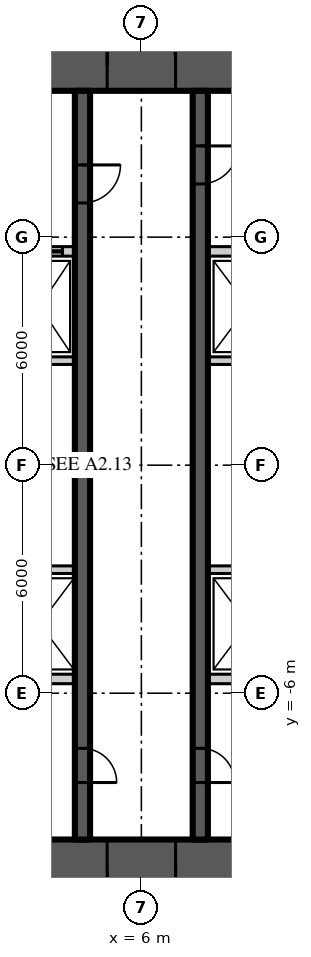
"""IFC4 building model, lengths in metres.
Left out: names, types, materials, properties, quantities, classifications, styles, units other than length and angle.
Written with IfcOpenShell. Run it as: python <this file> out.ifc"""

import sys

from ifc_helpers import new_model, si_unit, direction, frame, frame_2d, origin, place, context, subcontext, project, spatial, rectangle, extrude, element, fill, save


model = new_model("IFC4")
c1 = context("Model", 3, precision=1e-05, world=origin(), true_north=direction((0.0, 1.0)))
c2 = subcontext(c1, "Body", "Model", "MODEL_VIEW")
j1 = project(units=[si_unit("LENGTHUNIT", "METRE"), si_unit("PLANEANGLEUNIT", "RADIAN")], contexts=[c1])
p1 = place(None, origin())
s1 = spatial("IfcSite", under=j1, at=p1, CompositionType="ELEMENT")
p2 = place(p1, origin())
s2 = spatial("IfcBuilding", under=s1, at=p2, CompositionType="ELEMENT")
p3 = place(p2, frame((0.0, 0.0, 82.5)))
s3 = spatial("IfcBuildingStorey", under=s2, at=p3, CompositionType="ELEMENT", Elevation=82.5)
p4 = place(p3, frame((-11.15, 10.5, 0.0), z_axis=(0.0, 0.0, 1.0), x_axis=(1.0, 0.0, 0.0)))
e1 = element("IfcWall", 1, at=p4, inside=s3, PredefinedType="SHEAR", context=c2, shape_type="SweptSolid", body=[
    extrude(rectangle(XDim=22.3, YDim=1.3, at=frame_2d((11.15, 0.0))), origin(), (0.0, 0.0, 1.0), 3.9),
])
p5 = place(p4, frame((4.25, 0.0, 0.0)))
e2 = element("IfcOpeningElement", 2, at=p5, cuts=e1, PredefinedType="OPENING", context=c2, shape_type="SweptSolid", body=[
    extrude(rectangle(XDim=1.8, YDim=2.2, at=frame_2d((0.9, 1.1))), frame((0.0, 0.66, 0.0), z_axis=(0.0, -1.0, 0.0), x_axis=(1.0, 0.0, 0.0)), (0.0, 0.0, 1.0), 1.32),
])
p6 = place(p4, frame((16.25, 0.0, 0.0)))
e3 = element("IfcOpeningElement", 3, at=p6, cuts=e1, PredefinedType="OPENING", context=c2, shape_type="SweptSolid", body=[
    extrude(rectangle(XDim=1.8, YDim=2.2, at=frame_2d((0.9, 1.1))), frame((0.0, 0.66, 0.0), z_axis=(0.0, -1.0, 0.0), x_axis=(1.0, 0.0, 0.0)), (0.0, 0.0, 1.0), 1.32),
])
p7 = place(p3, frame((11.15, -10.5, 0.0), z_axis=(0.0, 0.0, 1.0), x_axis=(-1.0, 0.0, 0.0)))
e4 = element("IfcWall", 4, at=p7, inside=s3, PredefinedType="SHEAR", context=c2, shape_type="SweptSolid", body=[
    extrude(rectangle(XDim=22.3, YDim=1.3, at=frame_2d((11.15, 0.0))), origin(), (0.0, 0.0, 1.0), 3.9),
])
p8 = place(p7, frame((16.25, 0.0, 0.0)))
e5 = element("IfcOpeningElement", 5, at=p8, cuts=e4, PredefinedType="OPENING", context=c2, shape_type="SweptSolid", body=[
    extrude(rectangle(XDim=1.8, YDim=2.2, at=frame_2d((0.9, 1.1))), frame((0.0, 0.66, 0.0), z_axis=(0.0, -1.0, 0.0), x_axis=(1.0, 0.0, 0.0)), (0.0, 0.0, 1.0), 1.32),
])
p9 = place(p7, frame((4.25, 0.0, 0.0)))
e6 = element("IfcOpeningElement", 6, at=p9, cuts=e4, PredefinedType="OPENING", context=c2, shape_type="SweptSolid", body=[
    extrude(rectangle(XDim=1.8, YDim=2.2, at=frame_2d((0.9, 1.1))), frame((0.0, 0.66, 0.0), z_axis=(0.0, -1.0, 0.0), x_axis=(1.0, 0.0, 0.0)), (0.0, 0.0, 1.0), 1.32),
])
p10 = place(p3, frame((7.55, 9.85, 0.0), z_axis=(0.0, 0.0, 1.0), x_axis=(0.0, -1.0, 0.0)))
e7 = element("IfcWall", 7, at=p10, inside=s3, PredefinedType="SHEAR", context=c2, shape_type="SweptSolid", body=[
    extrude(rectangle(XDim=19.7, YDim=0.4, at=frame_2d((9.85, 0.0))), origin(), (0.0, 0.0, 1.0), 3.9),
])
p11 = place(p10, frame((1.45, 0.0, 0.0)))
e8 = element("IfcOpeningElement", 8, at=p11, cuts=e7, PredefinedType="OPENING", context=c2, shape_type="SweptSolid", body=[
    extrude(rectangle(XDim=1.0, YDim=2.2, at=frame_2d((0.5, 1.1))), frame((0.0, 0.21, 0.0), z_axis=(0.0, -1.0, 0.0), x_axis=(1.0, 0.0, 0.0)), (0.0, 0.0, 1.0), 0.42),
])
p12 = place(p10, frame((17.3, 0.0, 0.0)))
e9 = element("IfcOpeningElement", 9, at=p12, cuts=e7, PredefinedType="OPENING", context=c2, shape_type="SweptSolid", body=[
    extrude(rectangle(XDim=0.9, YDim=2.1, at=frame_2d((0.45, 1.05))), frame((0.0, 0.21, 0.0), z_axis=(0.0, -1.0, 0.0), x_axis=(1.0, 0.0, 0.0)), (0.0, 0.0, 1.0), 0.42),
])
p13 = place(p3, frame((4.45, 9.85, 0.0), z_axis=(0.0, 0.0, 1.0), x_axis=(0.0, -1.0, 0.0)))
e10 = element("IfcWall", 10, at=p13, inside=s3, PredefinedType="SHEAR", context=c2, shape_type="SweptSolid", body=[
    extrude(rectangle(XDim=19.7, YDim=0.4, at=frame_2d((9.85, 0.0))), origin(), (0.0, 0.0, 1.0), 3.9),
])
p14 = place(p13, frame((1.95, 0.0, 0.0)))
e11 = element("IfcOpeningElement", 11, at=p14, cuts=e10, PredefinedType="OPENING", context=c2, shape_type="SweptSolid", body=[
    extrude(rectangle(XDim=1.0, YDim=2.2, at=frame_2d((0.5, 1.1))), frame((0.0, 0.21, 0.0), z_axis=(0.0, -1.0, 0.0), x_axis=(1.0, 0.0, 0.0)), (0.0, 0.0, 1.0), 0.42),
])
p15 = place(p13, frame((17.3, 0.0, 0.0)))
e12 = element("IfcOpeningElement", 12, at=p15, cuts=e10, PredefinedType="OPENING", context=c2, shape_type="SweptSolid", body=[
    extrude(rectangle(XDim=0.9, YDim=2.1, at=frame_2d((0.45, 1.05))), frame((0.0, 0.21, 0.0), z_axis=(0.0, -1.0, 0.0), x_axis=(1.0, 0.0, 0.0)), (0.0, 0.0, 1.0), 0.42),
])
p16 = place(p3, frame((2.4, 5.625, 0.0), z_axis=(0.0, 0.0, 1.0), x_axis=(1.0, 0.0, 0.0)))
e13 = element("IfcWall", 13, at=p16, inside=s3, PredefinedType="SOLIDWALL", context=c2, shape_type="SweptSolid", body=[
    extrude(rectangle(XDim=1.85, YDim=0.25, at=frame_2d((0.925, 0.0))), origin(), (0.0, 0.0, 1.0), 3.7),
])
p17 = place(p16, frame((0.325, 0.0, 0.0)))
e14 = element("IfcOpeningElement", 14, at=p17, cuts=e13, PredefinedType="OPENING", context=c2, shape_type="SweptSolid", body=[
    extrude(rectangle(XDim=1.2, YDim=2.2, at=frame_2d((0.6, 1.1))), frame((0.0, 0.135, 0.0), z_axis=(0.0, -1.0, 0.0), x_axis=(1.0, 0.0, 0.0)), (0.0, 0.0, 1.0), 0.27),
])
p18 = place(p3, frame((7.75, 5.625, 0.0), z_axis=(0.0, 0.0, 1.0), x_axis=(1.0, 0.0, 0.0)))
e15 = element("IfcWall", 15, at=p18, inside=s3, PredefinedType="SOLIDWALL", context=c2, shape_type="SweptSolid", body=[
    extrude(rectangle(XDim=2.1, YDim=0.25, at=frame_2d((1.05, 0.0))), origin(), (0.0, 0.0, 1.0), 3.7),
])
p19 = place(p3, frame((2.4, -5.625, 0.0), z_axis=(0.0, 0.0, 1.0), x_axis=(1.0, 0.0, 0.0)))
e16 = element("IfcWall", 16, at=p19, inside=s3, PredefinedType="SOLIDWALL", context=c2, shape_type="SweptSolid", body=[
    extrude(rectangle(XDim=1.85, YDim=0.25, at=frame_2d((0.925, 0.0))), origin(), (0.0, 0.0, 1.0), 3.7),
])
p20 = place(p3, frame((7.75, -5.625, 0.0), z_axis=(0.0, 0.0, 1.0), x_axis=(1.0, 0.0, 0.0)))
e17 = element("IfcWall", 17, at=p20, inside=s3, PredefinedType="SOLIDWALL", context=c2, shape_type="SweptSolid", body=[
    extrude(rectangle(XDim=2.1, YDim=0.25, at=frame_2d((1.05, 0.0))), origin(), (0.0, 0.0, 1.0), 3.7),
])
p21 = place(p3, frame((2.4, -2.75, 0.0), z_axis=(0.0, 0.0, 1.0), x_axis=(1.0, 0.0, 0.0)))
e18 = element("IfcWall", 18, at=p21, inside=s3, PredefinedType="SOLIDWALL", context=c2, shape_type="SweptSolid", body=[
    extrude(rectangle(XDim=1.85, YDim=0.2, at=frame_2d((0.925, 0.0))), origin(), (0.0, 0.0, 1.0), 3.7),
])
p22 = place(p3, frame((7.75, -2.75, 0.0), z_axis=(0.0, 0.0, 1.0), x_axis=(1.0, 0.0, 0.0)))
e19 = element("IfcWall", 19, at=p22, inside=s3, PredefinedType="SOLIDWALL", context=c2, shape_type="SweptSolid", body=[
    extrude(rectangle(XDim=2.1, YDim=0.2, at=frame_2d((1.05, 0.0))), origin(), (0.0, 0.0, 1.0), 3.7),
])
p23 = place(p3, frame((2.4, 2.75, 0.0), z_axis=(0.0, 0.0, 1.0), x_axis=(1.0, 0.0, 0.0)))
e20 = element("IfcWall", 20, at=p23, inside=s3, PredefinedType="SOLIDWALL", context=c2, shape_type="SweptSolid", body=[
    extrude(rectangle(XDim=1.85, YDim=0.2, at=frame_2d((0.925, 0.0))), origin(), (0.0, 0.0, 1.0), 3.7),
])
p24 = place(p3, frame((7.75, 2.75, 0.0), z_axis=(0.0, 0.0, 1.0), x_axis=(1.0, 0.0, 0.0)))
e21 = element("IfcWall", 21, at=p24, inside=s3, PredefinedType="SOLIDWALL", context=c2, shape_type="SweptSolid", body=[
    extrude(rectangle(XDim=2.1, YDim=0.2, at=frame_2d((1.05, 0.0))), origin(), (0.0, 0.0, 1.0), 3.7),
])
p25 = place(p6, origin())
e22 = element("IfcDoor", 22, at=p25, inside=s3, OperationType="DOUBLE_DOOR_DOUBLE_SWING", PredefinedType="DOOR", context=c2, shape_type="SweptSolid", body=[
    extrude(rectangle(XDim=1.8, YDim=2.2, at=frame_2d((0.9, 1.1))), frame((0.0, 0.025, 0.0), z_axis=(0.0, -1.0, 0.0), x_axis=(1.0, 0.0, 0.0)), (0.0, 0.0, 1.0), 0.05),
])
fill(e3, e22)
p26 = place(p9, origin())
e23 = element("IfcDoor", 23, at=p26, inside=s3, OperationType="DOUBLE_DOOR_DOUBLE_SWING", PredefinedType="DOOR", context=c2, shape_type="SweptSolid", body=[
    extrude(rectangle(XDim=1.8, YDim=2.2, at=frame_2d((0.9, 1.1))), frame((0.0, 0.025, 0.0), z_axis=(0.0, -1.0, 0.0), x_axis=(1.0, 0.0, 0.0)), (0.0, 0.0, 1.0), 0.05),
])
fill(e6, e23)
p27 = place(p11, origin())
e24 = element("IfcDoor", 24, at=p27, inside=s3, OperationType="SINGLE_SWING_LEFT", PredefinedType="DOOR", context=c2, shape_type="SweptSolid", body=[
    extrude(rectangle(XDim=1.0, YDim=2.2, at=frame_2d((0.5, 1.1))), frame((0.0, 0.025, 0.0), z_axis=(0.0, -1.0, 0.0), x_axis=(1.0, 0.0, 0.0)), (0.0, 0.0, 1.0), 0.05),
])
fill(e8, e24)
p28 = place(p14, origin())
e25 = element("IfcDoor", 25, at=p28, inside=s3, OperationType="SINGLE_SWING_LEFT", PredefinedType="DOOR", context=c2, shape_type="SweptSolid", body=[
    extrude(rectangle(XDim=1.0, YDim=2.2, at=frame_2d((0.5, 1.1))), frame((0.0, 0.025, 0.0), z_axis=(0.0, -1.0, 0.0), x_axis=(1.0, 0.0, 0.0)), (0.0, 0.0, 1.0), 0.05),
])
fill(e11, e25)
p29 = place(p12, origin())
e26 = element("IfcDoor", 26, at=p29, inside=s3, OperationType="SINGLE_SWING_RIGHT", PredefinedType="DOOR", context=c2, shape_type="SweptSolid", body=[
    extrude(rectangle(XDim=0.9, YDim=2.1, at=frame_2d((0.45, 1.05))), frame((0.0, 0.025, 0.0), z_axis=(0.0, -1.0, 0.0), x_axis=(1.0, 0.0, 0.0)), (0.0, 0.0, 1.0), 0.05),
])
fill(e9, e26)
p30 = place(p15, origin())
e27 = element("IfcDoor", 27, at=p30, inside=s3, OperationType="SINGLE_SWING_RIGHT", PredefinedType="DOOR", context=c2, shape_type="SweptSolid", body=[
    extrude(rectangle(XDim=0.9, YDim=2.1, at=frame_2d((0.45, 1.05))), frame((0.0, 0.025, 0.0), z_axis=(0.0, -1.0, 0.0), x_axis=(1.0, 0.0, 0.0)), (0.0, 0.0, 1.0), 0.05),
])
fill(e12, e27)
p31 = place(p17, origin())
e28 = element("IfcDoor", 28, at=p31, inside=s3, OperationType="SLIDING_TO_LEFT", PredefinedType="DOOR", context=c2, shape_type="SweptSolid", body=[
    extrude(rectangle(XDim=1.2, YDim=2.2, at=frame_2d((0.6, 1.1))), frame((0.0, 0.025, 0.0), z_axis=(0.0, -1.0, 0.0), x_axis=(1.0, 0.0, 0.0)), (0.0, 0.0, 1.0), 0.05),
])
fill(e14, e28)
save(model, sys.argv[1])
